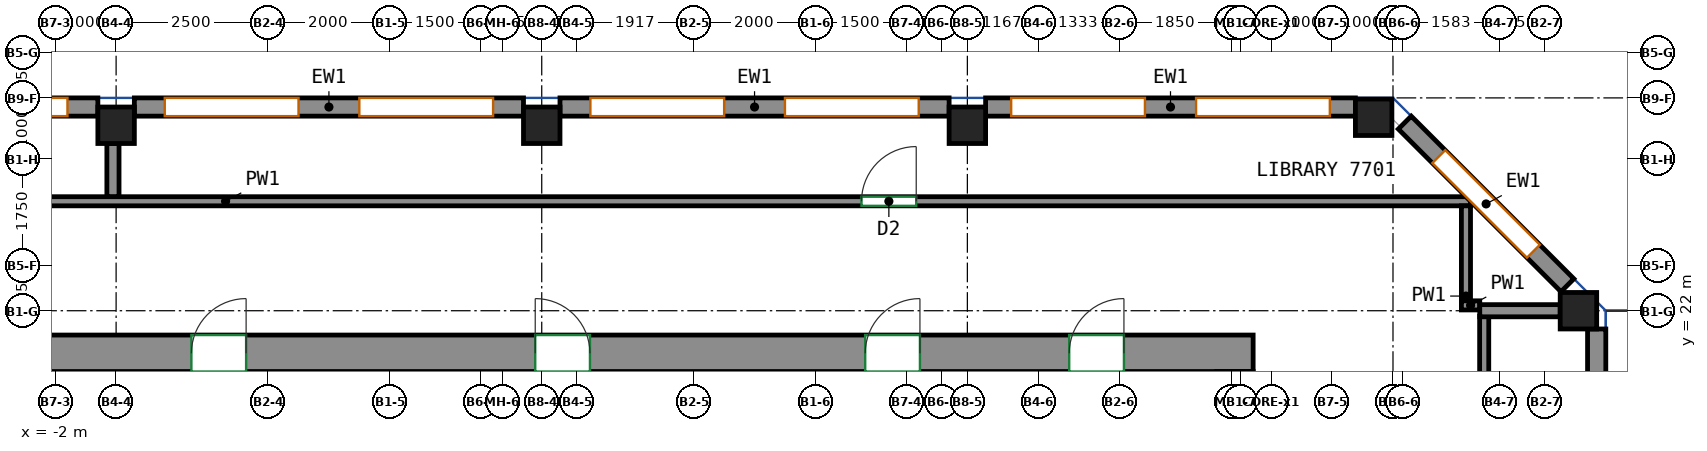
"""IFC4 building model, lengths in metres.
Left out: names, types, materials, properties, quantities, classifications, styles, units other than length and angle.
Written with IfcOpenShell. Run it as: python <this file> out.ifc"""

import sys

from ifc_helpers import new_model, si_unit, direction, frame, frame_2d, origin, origin_2d, place, context, subcontext, project, spatial, rectangle, extrude, source, transform, mapped, element, fill, save


model = new_model("IFC4")
c1 = context("Model", 3, precision=1e-05, world=origin(), true_north=direction((0.0, 1.0)))
c2 = subcontext(c1, "Body", "Model", "MODEL_VIEW")
j1 = project(units=[si_unit("LENGTHUNIT", "METRE"), si_unit("PLANEANGLEUNIT", "RADIAN")], contexts=[c1])
p1 = place(None, origin())
s1 = spatial("IfcSite", under=j1, at=p1, CompositionType="ELEMENT")
p2 = place(p1, origin())
s2 = spatial("IfcBuilding", under=s1, at=p2, CompositionType="ELEMENT")
p3 = place(p2, frame((0.0, 0.0, 308.6)))
s3 = spatial("IfcBuildingStorey", under=s2, at=p3, CompositionType="ELEMENT", Elevation=308.6)
m1 = source(origin(), c2, "Body", "SweptSolid", [
    extrude(rectangle(XDim=0.6, YDim=0.6, at=origin_2d()), origin(), (0.0, 0.0, 1.0), 3.12),
])
for number, where, z_axis, x_axis in (
    (1, (-1.0, 25.05, 0.0), (0.0, 0.0, 1.0), (1.0, 0.0, 0.0)),
    (2, (6.0, 25.05, 0.0), (0.0, 0.0, 1.0), (1.0, 0.0, 0.0)),
    (3, (13.0, 25.05, 0.0), (0.0, 0.0, 1.0), (1.0, 0.0, 0.0)),
    (4, (19.682, 25.182, 0.0), (0.0, 0.0, 1.0), (1.0, 0.0, 0.0)),
    (5, (23.05, 22.0, 0.0), (0.0, 0.0, 1.0), (1.0, 0.0, 0.0)),
):
    element("IfcColumn", number, at=place(p3, frame(where, z_axis=z_axis, x_axis=x_axis)), inside=s3, PredefinedType="COLUMN", context=c2, shape_type="MappedRepresentation", body=[
        mapped(m1, transform((0.0, 0.0, 0.0))),
    ])
m2 = source(origin(), c2, "Body", "SweptSolid", [
    extrude(rectangle(XDim=33.3, YDim=0.6, at=frame_2d((16.65, 0.0))), origin(), (0.0, 0.0, 1.0), 3.12),
])
p4 = place(p3, frame((-15.6, 21.3, 0.0), z_axis=(0.0, 0.0, 1.0), x_axis=(1.0, 0.0, 0.0)))
e6 = element("IfcWall", 6, at=p4, inside=s3, PredefinedType="SHEAR", context=c2, shape_type="MappedRepresentation", body=[
    mapped(m2, transform((0.0, 0.0, 0.0))),
])
p5 = place(p4, frame((5.708, 0.0, 0.0)))
e7 = element("IfcOpeningElement", 7, at=p5, cuts=e6, PredefinedType="OPENING", context=c2, shape_type="SweptSolid", body=[
    extrude(rectangle(XDim=0.9, YDim=2.1, at=frame_2d((0.45, 1.05))), frame((0.0, 0.31, 0.0), z_axis=(0.0, -1.0, 0.0), x_axis=(1.0, 0.0, 0.0)), (0.0, 0.0, 1.0), 0.62),
])
p6 = place(p4, frame((10.773, 0.0, 0.0)))
e8 = element("IfcOpeningElement", 8, at=p6, cuts=e6, PredefinedType="OPENING", context=c2, shape_type="SweptSolid", body=[
    extrude(rectangle(XDim=0.9, YDim=2.1, at=frame_2d((0.45, 1.05))), frame((0.0, 0.31, 0.0), z_axis=(0.0, -1.0, 0.0), x_axis=(1.0, 0.0, 0.0)), (0.0, 0.0, 1.0), 0.62),
])
p7 = place(p4, frame((15.838, 0.0, 0.0)))
e9 = element("IfcOpeningElement", 9, at=p7, cuts=e6, PredefinedType="OPENING", context=c2, shape_type="SweptSolid", body=[
    extrude(rectangle(XDim=0.9, YDim=2.1, at=frame_2d((0.45, 1.05))), frame((0.0, 0.31, 0.0), z_axis=(0.0, -1.0, 0.0), x_axis=(1.0, 0.0, 0.0)), (0.0, 0.0, 1.0), 0.62),
])
p8 = place(p4, frame((21.493, 0.0, 0.0)))
e10 = element("IfcOpeningElement", 10, at=p8, cuts=e6, PredefinedType="OPENING", context=c2, shape_type="SweptSolid", body=[
    extrude(rectangle(XDim=0.9, YDim=2.1, at=frame_2d((0.45, 1.05))), frame((0.0, 0.31, 0.0), z_axis=(0.0, -1.0, 0.0), x_axis=(1.0, 0.0, 0.0)), (0.0, 0.0, 1.0), 0.62),
])
p9 = place(p4, frame((26.92, 0.0, 0.0)))
e11 = element("IfcOpeningElement", 11, at=p9, cuts=e6, PredefinedType="OPENING", context=c2, shape_type="SweptSolid", body=[
    extrude(rectangle(XDim=0.9, YDim=2.1, at=frame_2d((0.45, 1.05))), frame((0.0, 0.31, 0.0), z_axis=(0.0, -1.0, 0.0), x_axis=(1.0, 0.0, 0.0)), (0.0, 0.0, 1.0), 0.62),
])
p10 = place(p4, frame((2.125, 0.0, 0.0)))
e12 = element("IfcOpeningElement", 12, at=p10, cuts=e6, PredefinedType="OPENING", context=c2, shape_type="SweptSolid", body=[
    extrude(rectangle(XDim=0.9, YDim=2.1, at=frame_2d((0.45, 1.05))), frame((0.0, 0.31, 0.0), z_axis=(0.0, -1.0, 0.0), x_axis=(1.0, 0.0, 0.0)), (0.0, 0.0, 1.0), 0.62),
])
p11 = place(p4, frame((30.275, 0.0, 0.0)))
e13 = element("IfcOpeningElement", 13, at=p11, cuts=e6, PredefinedType="OPENING", context=c2, shape_type="SweptSolid", body=[
    extrude(rectangle(XDim=0.9, YDim=2.1, at=frame_2d((0.45, 1.05))), frame((0.0, 0.31, 0.0), z_axis=(0.0, -1.0, 0.0), x_axis=(1.0, 0.0, 0.0)), (0.0, 0.0, 1.0), 0.62),
])
m3 = source(origin(), c2, "Body", "SweptSolid", [
    extrude(rectangle(XDim=13.4, YDim=0.3, at=frame_2d((6.7, 0.0))), origin(), (0.0, 0.0, 1.0), 3.12),
])
p12 = place(p3, frame((23.35, 8.3, 0.0), z_axis=(0.0, 0.0, 1.0), x_axis=(0.0, 1.0, 0.0)))
e14 = element("IfcWall", 14, at=p12, inside=s3, PredefinedType="SOLIDWALL", context=c2, shape_type="MappedRepresentation", body=[
    mapped(m3, transform((0.0, 0.0, 0.0))),
])
p13 = place(p12, frame((0.85, 0.0, 0.8)))
e15 = element("IfcOpeningElement", 15, at=p13, cuts=e14, PredefinedType="OPENING", context=c2, shape_type="SweptSolid", body=[
    extrude(rectangle(XDim=1.5, YDim=2.05, at=frame_2d((0.75, 1.025))), frame((0.0, 0.16, 0.0), z_axis=(0.0, -1.0, 0.0), x_axis=(1.0, 0.0, 0.0)), (0.0, 0.0, 1.0), 0.32),
])
p14 = place(p12, frame((4.95, 0.0, 0.8)))
e16 = element("IfcOpeningElement", 16, at=p14, cuts=e14, PredefinedType="OPENING", context=c2, shape_type="SweptSolid", body=[
    extrude(rectangle(XDim=1.5, YDim=2.05, at=frame_2d((0.75, 1.025))), frame((0.0, 0.16, 0.0), z_axis=(0.0, -1.0, 0.0), x_axis=(1.0, 0.0, 0.0)), (0.0, 0.0, 1.0), 0.32),
])
p15 = place(p12, frame((8.45, 0.0, 0.8)))
e17 = element("IfcOpeningElement", 17, at=p15, cuts=e14, PredefinedType="OPENING", context=c2, shape_type="SweptSolid", body=[
    extrude(rectangle(XDim=1.5, YDim=2.05, at=frame_2d((0.75, 1.025))), frame((0.0, 0.16, 0.0), z_axis=(0.0, -1.0, 0.0), x_axis=(1.0, 0.0, 0.0)), (0.0, 0.0, 1.0), 0.32),
])
p16 = place(p12, frame((11.05, 0.0, 0.8)))
e18 = element("IfcOpeningElement", 18, at=p16, cuts=e14, PredefinedType="OPENING", context=c2, shape_type="SweptSolid", body=[
    extrude(rectangle(XDim=1.5, YDim=2.05, at=frame_2d((0.75, 1.025))), frame((0.0, 0.16, 0.0), z_axis=(0.0, -1.0, 0.0), x_axis=(1.0, 0.0, 0.0)), (0.0, 0.0, 1.0), 0.32),
])
m4 = source(origin(), c2, "Body", "SweptSolid", [
    extrude(rectangle(XDim=3.783, YDim=0.3, at=frame_2d((1.892, 0.0))), origin(), (0.0, 0.0, 1.0), 3.12),
])
p17 = place(p3, frame((22.869, 22.419, 0.0), z_axis=(0.0, 0.0, 1.0), x_axis=(-0.707106781187, 0.707106781187, 0.0)))
e19 = element("IfcWall", 19, at=p17, inside=s3, PredefinedType="SOLIDWALL", context=c2, shape_type="MappedRepresentation", body=[
    mapped(m4, transform((0.0, 0.0, 0.0))),
])
p18 = place(p17, frame((0.792, 0.0, 0.8)))
e20 = element("IfcOpeningElement", 20, at=p18, cuts=e19, PredefinedType="OPENING", context=c2, shape_type="SweptSolid", body=[
    extrude(rectangle(XDim=2.2, YDim=2.05, at=frame_2d((1.1, 1.025))), frame((0.0, 0.16, 0.0), z_axis=(0.0, -1.0, 0.0), x_axis=(1.0, 0.0, 0.0)), (0.0, 0.0, 1.0), 0.32),
])
m5 = source(origin(), c2, "Body", "SweptSolid", [
    extrude(rectangle(XDim=6.082, YDim=0.3, at=frame_2d((3.041, 0.0))), origin(), (0.0, 0.0, 1.0), 3.12),
])
p19 = place(p3, frame((19.382, 25.35, 0.0), z_axis=(0.0, 0.0, 1.0), x_axis=(-1.0, 0.0, 0.0)))
e21 = element("IfcWall", 21, at=p19, inside=s3, PredefinedType="SOLIDWALL", context=c2, shape_type="MappedRepresentation", body=[
    mapped(m5, transform((0.0, 0.0, 0.0))),
])
p20 = place(p19, frame((0.42, 0.0, 0.8)))
e22 = element("IfcOpeningElement", 22, at=p20, cuts=e21, PredefinedType="OPENING", context=c2, shape_type="SweptSolid", body=[
    extrude(rectangle(XDim=2.2, YDim=2.05, at=frame_2d((1.1, 1.025))), frame((0.0, 0.16, 0.0), z_axis=(0.0, -1.0, 0.0), x_axis=(1.0, 0.0, 0.0)), (0.0, 0.0, 1.0), 0.32),
])
p21 = place(p19, frame((3.461, 0.0, 0.8)))
e23 = element("IfcOpeningElement", 23, at=p21, cuts=e21, PredefinedType="OPENING", context=c2, shape_type="SweptSolid", body=[
    extrude(rectangle(XDim=2.2, YDim=2.05, at=frame_2d((1.1, 1.025))), frame((0.0, 0.16, 0.0), z_axis=(0.0, -1.0, 0.0), x_axis=(1.0, 0.0, 0.0)), (0.0, 0.0, 1.0), 0.32),
])
m6 = source(origin(), c2, "Body", "SweptSolid", [
    extrude(rectangle(XDim=6.4, YDim=0.3, at=frame_2d((3.2, 0.0))), origin(), (0.0, 0.0, 1.0), 3.12),
])
p22 = place(p3, frame((12.7, 25.35, 0.0), z_axis=(0.0, 0.0, 1.0), x_axis=(-1.0, 0.0, 0.0)))
e24 = element("IfcWall", 24, at=p22, inside=s3, PredefinedType="SOLIDWALL", context=c2, shape_type="MappedRepresentation", body=[
    mapped(m6, transform((0.0, 0.0, 0.0))),
])
p23 = place(p22, frame((0.5, 0.0, 0.8)))
e25 = element("IfcOpeningElement", 25, at=p23, cuts=e24, PredefinedType="OPENING", context=c2, shape_type="SweptSolid", body=[
    extrude(rectangle(XDim=2.2, YDim=2.05, at=frame_2d((1.1, 1.025))), frame((0.0, 0.16, 0.0), z_axis=(0.0, -1.0, 0.0), x_axis=(1.0, 0.0, 0.0)), (0.0, 0.0, 1.0), 0.32),
])
p24 = place(p22, frame((3.7, 0.0, 0.8)))
e26 = element("IfcOpeningElement", 26, at=p24, cuts=e24, PredefinedType="OPENING", context=c2, shape_type="SweptSolid", body=[
    extrude(rectangle(XDim=2.2, YDim=2.05, at=frame_2d((1.1, 1.025))), frame((0.0, 0.16, 0.0), z_axis=(0.0, -1.0, 0.0), x_axis=(1.0, 0.0, 0.0)), (0.0, 0.0, 1.0), 0.32),
])
p25 = place(p3, frame((5.7, 25.35, 0.0), z_axis=(0.0, 0.0, 1.0), x_axis=(-1.0, 0.0, 0.0)))
e27 = element("IfcWall", 27, at=p25, inside=s3, PredefinedType="SOLIDWALL", context=c2, shape_type="MappedRepresentation", body=[
    mapped(m6, transform((0.0, 0.0, 0.0))),
])
p26 = place(p25, frame((0.5, 0.0, 0.8)))
e28 = element("IfcOpeningElement", 28, at=p26, cuts=e27, PredefinedType="OPENING", context=c2, shape_type="SweptSolid", body=[
    extrude(rectangle(XDim=2.2, YDim=2.05, at=frame_2d((1.1, 1.025))), frame((0.0, 0.16, 0.0), z_axis=(0.0, -1.0, 0.0), x_axis=(1.0, 0.0, 0.0)), (0.0, 0.0, 1.0), 0.32),
])
p27 = place(p25, frame((3.7, 0.0, 0.8)))
e29 = element("IfcOpeningElement", 29, at=p27, cuts=e27, PredefinedType="OPENING", context=c2, shape_type="SweptSolid", body=[
    extrude(rectangle(XDim=2.2, YDim=2.05, at=frame_2d((1.1, 1.025))), frame((0.0, 0.16, 0.0), z_axis=(0.0, -1.0, 0.0), x_axis=(1.0, 0.0, 0.0)), (0.0, 0.0, 1.0), 0.32),
])
p28 = place(p3, frame((-1.3, 25.35, 0.0), z_axis=(0.0, 0.0, 1.0), x_axis=(-1.0, 0.0, 0.0)))
e30 = element("IfcWall", 30, at=p28, inside=s3, PredefinedType="SOLIDWALL", context=c2, shape_type="MappedRepresentation", body=[
    mapped(m6, transform((0.0, 0.0, 0.0))),
])
p29 = place(p28, frame((0.5, 0.0, 0.8)))
e31 = element("IfcOpeningElement", 31, at=p29, cuts=e30, PredefinedType="OPENING", context=c2, shape_type="SweptSolid", body=[
    extrude(rectangle(XDim=2.2, YDim=2.05, at=frame_2d((1.1, 1.025))), frame((0.0, 0.16, 0.0), z_axis=(0.0, -1.0, 0.0), x_axis=(1.0, 0.0, 0.0)), (0.0, 0.0, 1.0), 0.32),
])
p30 = place(p28, frame((3.7, 0.0, 0.8)))
e32 = element("IfcOpeningElement", 32, at=p30, cuts=e30, PredefinedType="OPENING", context=c2, shape_type="SweptSolid", body=[
    extrude(rectangle(XDim=2.2, YDim=2.05, at=frame_2d((1.1, 1.025))), frame((0.0, 0.16, 0.0), z_axis=(0.0, -1.0, 0.0), x_axis=(1.0, 0.0, 0.0)), (0.0, 0.0, 1.0), 0.32),
])
p31 = place(p3, frame((21.5, -7.75, 0.0), z_axis=(0.0, 0.0, 1.0), x_axis=(0.0, 1.0, 0.0)))
e33 = element("IfcWall", 33, at=p31, inside=s3, PredefinedType="PARTITIONING", context=c2, shape_type="SweptSolid", body=[
    extrude(rectangle(XDim=29.66, YDim=0.15, at=frame_2d((14.83, 0.0))), origin(), (0.0, 0.0, 1.0), 3.12),
])
p32 = place(p31, frame((20.142, 0.0, 0.0)))
e34 = element("IfcOpeningElement", 34, at=p32, cuts=e33, PredefinedType="OPENING", context=c2, shape_type="SweptSolid", body=[
    extrude(rectangle(XDim=0.9, YDim=2.1, at=frame_2d((0.45, 1.05))), frame((0.0, 0.085, 0.0), z_axis=(0.0, -1.0, 0.0), x_axis=(1.0, 0.0, 0.0)), (0.0, 0.0, 1.0), 0.17),
])
p33 = place(p3, frame((-19.675, 23.8, 0.0), z_axis=(0.0, 0.0, 1.0), x_axis=(1.0, 0.0, 0.0)))
e35 = element("IfcWall", 35, at=p33, inside=s3, PredefinedType="PARTITIONING", context=c2, shape_type="SweptSolid", body=[
    extrude(rectangle(XDim=40.95, YDim=0.15, at=frame_2d((20.475, 0.0))), origin(), (0.0, 0.0, 1.0), 3.12),
])
p34 = place(p33, frame((8.716, 0.0, 0.0)))
e36 = element("IfcOpeningElement", 36, at=p34, cuts=e35, PredefinedType="OPENING", context=c2, shape_type="SweptSolid", body=[
    extrude(rectangle(XDim=0.9, YDim=2.1, at=frame_2d((0.45, 1.05))), frame((0.0, 0.085, 0.0), z_axis=(0.0, -1.0, 0.0), x_axis=(1.0, 0.0, 0.0)), (0.0, 0.0, 1.0), 0.17),
])
p35 = place(p33, frame((30.934, 0.0, 0.0)))
e37 = element("IfcOpeningElement", 37, at=p35, cuts=e35, PredefinedType="OPENING", context=c2, shape_type="SweptSolid", body=[
    extrude(rectangle(XDim=0.9, YDim=2.1, at=frame_2d((0.45, 1.05))), frame((0.0, 0.085, 0.0), z_axis=(0.0, -1.0, 0.0), x_axis=(1.0, 0.0, 0.0)), (0.0, 0.0, 1.0), 0.17),
])
p36 = place(p3, frame((21.2, 22.163, 0.0), z_axis=(0.0, 0.0, 1.0), x_axis=(0.0, 1.0, 0.0)))
e38 = element("IfcWall", 38, at=p36, inside=s3, PredefinedType="PARTITIONING", context=c2, shape_type="SweptSolid", body=[
    extrude(rectangle(XDim=1.562, YDim=0.15, at=frame_2d((0.781, 0.0))), origin(), (0.0, 0.0, 1.0), 3.12),
])
p37 = place(p3, frame((21.427, 22.088, 0.0), z_axis=(0.0, 0.0, 1.0), x_axis=(-1.0, 0.0, 0.0)))
e39 = element("IfcWall", 39, at=p37, inside=s3, PredefinedType="PARTITIONING", context=c2, shape_type="SweptSolid", body=[
    extrude(rectangle(XDim=0.302, YDim=0.15, at=frame_2d((0.151, 0.0))), origin(), (0.0, 0.0, 1.0), 3.12),
])
p38 = place(p3, frame((22.75, 22.0, 0.0), z_axis=(0.0, 0.0, 1.0), x_axis=(-1.0, 0.0, 0.0)))
e40 = element("IfcWall", 40, at=p38, inside=s3, PredefinedType="PARTITIONING", context=c2, shape_type="SweptSolid", body=[
    extrude(rectangle(XDim=1.323, YDim=0.2, at=frame_2d((0.662, 0.0))), origin(), (0.0, 0.0, 1.0), 3.12),
])
p39 = place(p3, frame((-1.052, 23.877, 0.0), z_axis=(0.0, 0.0, 1.0), x_axis=(0.0, 1.0, 0.0)))
e41 = element("IfcWall", 41, at=p39, inside=s3, PredefinedType="PARTITIONING", context=c2, shape_type="SweptSolid", body=[
    extrude(rectangle(XDim=0.873, YDim=0.2, at=frame_2d((0.437, 0.0))), origin(), (0.0, 0.0, 1.0), 3.12),
])
p40 = place(p18, origin())
e42 = element("IfcWindow", 42, at=p40, inside=s3, PartitioningType="SINGLE_PANEL", PredefinedType="WINDOW", context=c2, shape_type="SweptSolid", body=[
    extrude(rectangle(XDim=2.2, YDim=2.05, at=frame_2d((1.1, 1.025))), frame((0.0, 0.03, 0.0), z_axis=(0.0, -1.0, 0.0), x_axis=(1.0, 0.0, 0.0)), (0.0, 0.0, 1.0), 0.06),
])
fill(e20, e42)
p41 = place(p20, origin())
e43 = element("IfcWindow", 43, at=p41, inside=s3, PartitioningType="SINGLE_PANEL", PredefinedType="WINDOW", context=c2, shape_type="SweptSolid", body=[
    extrude(rectangle(XDim=2.2, YDim=2.05, at=frame_2d((1.1, 1.025))), frame((0.0, 0.03, 0.0), z_axis=(0.0, -1.0, 0.0), x_axis=(1.0, 0.0, 0.0)), (0.0, 0.0, 1.0), 0.06),
])
fill(e22, e43)
p42 = place(p21, origin())
e44 = element("IfcWindow", 44, at=p42, inside=s3, PartitioningType="SINGLE_PANEL", PredefinedType="WINDOW", context=c2, shape_type="SweptSolid", body=[
    extrude(rectangle(XDim=2.2, YDim=2.05, at=frame_2d((1.1, 1.025))), frame((0.0, 0.03, 0.0), z_axis=(0.0, -1.0, 0.0), x_axis=(1.0, 0.0, 0.0)), (0.0, 0.0, 1.0), 0.06),
])
fill(e23, e44)
p43 = place(p23, origin())
e45 = element("IfcWindow", 45, at=p43, inside=s3, PartitioningType="SINGLE_PANEL", PredefinedType="WINDOW", context=c2, shape_type="SweptSolid", body=[
    extrude(rectangle(XDim=2.2, YDim=2.05, at=frame_2d((1.1, 1.025))), frame((0.0, 0.03, 0.0), z_axis=(0.0, -1.0, 0.0), x_axis=(1.0, 0.0, 0.0)), (0.0, 0.0, 1.0), 0.06),
])
fill(e25, e45)
p44 = place(p24, origin())
e46 = element("IfcWindow", 46, at=p44, inside=s3, PartitioningType="SINGLE_PANEL", PredefinedType="WINDOW", context=c2, shape_type="SweptSolid", body=[
    extrude(rectangle(XDim=2.2, YDim=2.05, at=frame_2d((1.1, 1.025))), frame((0.0, 0.03, 0.0), z_axis=(0.0, -1.0, 0.0), x_axis=(1.0, 0.0, 0.0)), (0.0, 0.0, 1.0), 0.06),
])
fill(e26, e46)
p45 = place(p26, origin())
e47 = element("IfcWindow", 47, at=p45, inside=s3, PartitioningType="SINGLE_PANEL", PredefinedType="WINDOW", context=c2, shape_type="SweptSolid", body=[
    extrude(rectangle(XDim=2.2, YDim=2.05, at=frame_2d((1.1, 1.025))), frame((0.0, 0.03, 0.0), z_axis=(0.0, -1.0, 0.0), x_axis=(1.0, 0.0, 0.0)), (0.0, 0.0, 1.0), 0.06),
])
fill(e28, e47)
p46 = place(p27, origin())
e48 = element("IfcWindow", 48, at=p46, inside=s3, PartitioningType="SINGLE_PANEL", PredefinedType="WINDOW", context=c2, shape_type="SweptSolid", body=[
    extrude(rectangle(XDim=2.2, YDim=2.05, at=frame_2d((1.1, 1.025))), frame((0.0, 0.03, 0.0), z_axis=(0.0, -1.0, 0.0), x_axis=(1.0, 0.0, 0.0)), (0.0, 0.0, 1.0), 0.06),
])
fill(e29, e48)
p47 = place(p29, origin())
e49 = element("IfcWindow", 49, at=p47, inside=s3, PartitioningType="SINGLE_PANEL", PredefinedType="WINDOW", context=c2, shape_type="SweptSolid", body=[
    extrude(rectangle(XDim=2.2, YDim=2.05, at=frame_2d((1.1, 1.025))), frame((0.0, 0.03, 0.0), z_axis=(0.0, -1.0, 0.0), x_axis=(1.0, 0.0, 0.0)), (0.0, 0.0, 1.0), 0.06),
])
fill(e31, e49)
p48 = place(p7, origin())
e50 = element("IfcDoor", 50, at=p48, inside=s3, OperationType="SINGLE_SWING_RIGHT", PredefinedType="DOOR", context=c2, shape_type="SweptSolid", body=[
    extrude(rectangle(XDim=0.9, YDim=2.1, at=frame_2d((0.45, 1.05))), frame((0.0, -0.155, 0.0), z_axis=(0.0, -1.0, 0.0), x_axis=(1.0, 0.0, 0.0)), (0.0, 0.0, 1.0), 0.05),
])
fill(e9, e50)
p49 = place(p8, origin())
e51 = element("IfcDoor", 51, at=p49, inside=s3, OperationType="SINGLE_SWING_LEFT", PredefinedType="DOOR", context=c2, shape_type="SweptSolid", body=[
    extrude(rectangle(XDim=0.9, YDim=2.1, at=frame_2d((0.45, 1.05))), frame((0.0, -0.155, 0.0), z_axis=(0.0, -1.0, 0.0), x_axis=(1.0, 0.0, 0.0)), (0.0, 0.0, 1.0), 0.05),
])
fill(e10, e51)
p50 = place(p9, origin())
e52 = element("IfcDoor", 52, at=p50, inside=s3, OperationType="SINGLE_SWING_RIGHT", PredefinedType="DOOR", context=c2, shape_type="SweptSolid", body=[
    extrude(rectangle(XDim=0.9, YDim=2.1, at=frame_2d((0.45, 1.05))), frame((0.0, -0.155, 0.0), z_axis=(0.0, -1.0, 0.0), x_axis=(1.0, 0.0, 0.0)), (0.0, 0.0, 1.0), 0.05),
])
fill(e11, e52)
p51 = place(p11, origin())
e53 = element("IfcDoor", 53, at=p51, inside=s3, OperationType="SINGLE_SWING_RIGHT", PredefinedType="DOOR", context=c2, shape_type="SweptSolid", body=[
    extrude(rectangle(XDim=0.9, YDim=2.1, at=frame_2d((0.45, 1.05))), frame((0.0, -0.155, 0.0), z_axis=(0.0, -1.0, 0.0), x_axis=(1.0, 0.0, 0.0)), (0.0, 0.0, 1.0), 0.05),
])
fill(e13, e53)
p52 = place(p35, origin())
e54 = element("IfcDoor", 54, at=p52, inside=s3, OperationType="SINGLE_SWING_RIGHT", PredefinedType="DOOR", context=c2, shape_type="SweptSolid", body=[
    extrude(rectangle(XDim=0.9, YDim=2.1, at=frame_2d((0.45, 1.05))), frame((0.0, 0.025, 0.0), z_axis=(0.0, -1.0, 0.0), x_axis=(1.0, 0.0, 0.0)), (0.0, 0.0, 1.0), 0.05),
])
fill(e37, e54)
save(model, sys.argv[1])
